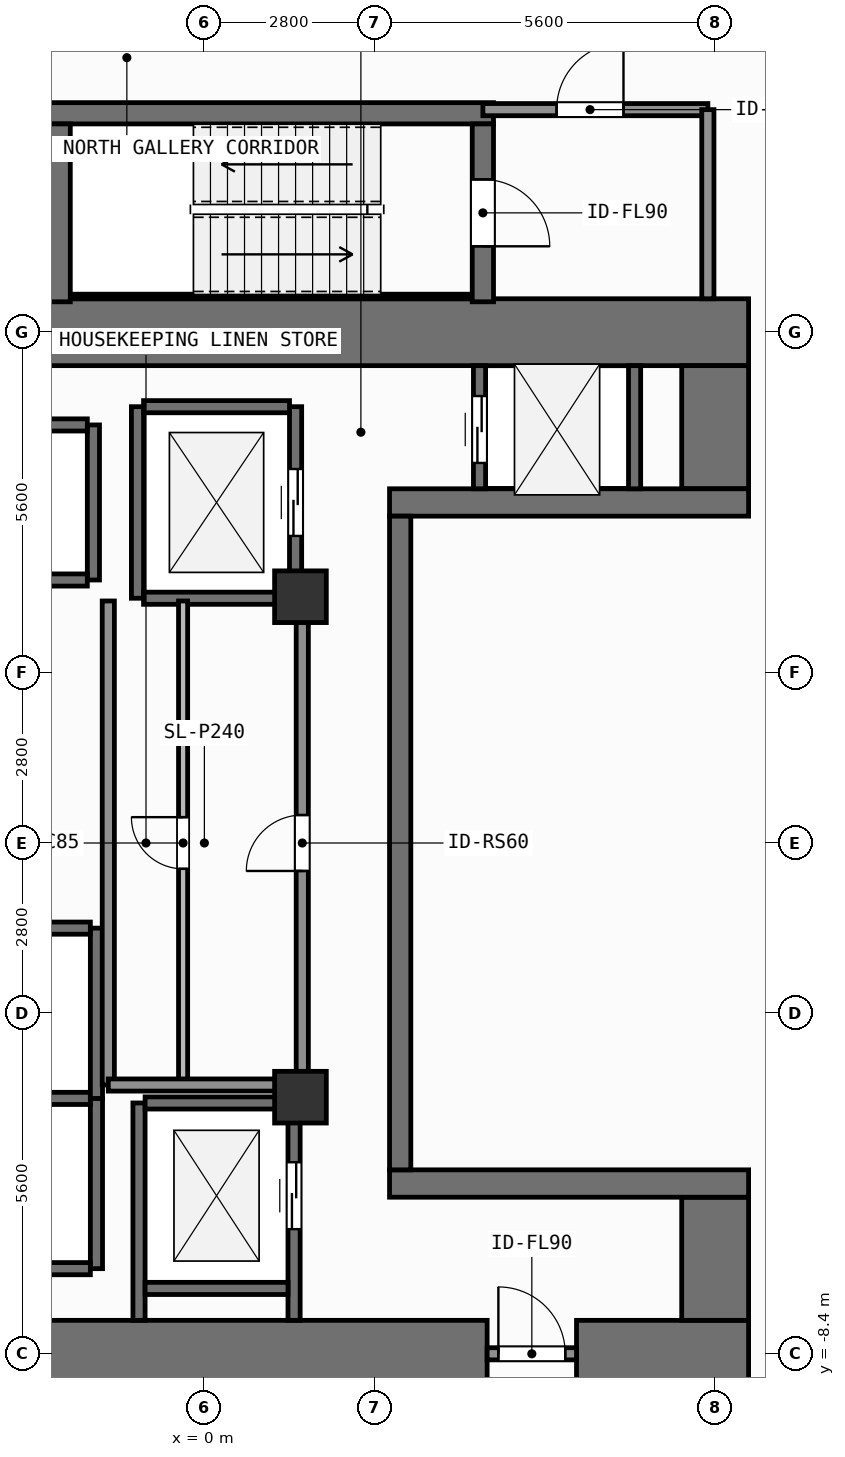
"""IFC4 building model, lengths in metres.
Left out: names, types, materials, properties, quantities, classifications, styles, units other than length and angle.
Written with IfcOpenShell. Run it as: python <this file> out.ifc"""

import sys

from ifc_helpers import new_model, si_unit, direction, frame, frame_2d, origin, origin_2d, place, context, subcontext, project, spatial, rectangle, extrude, element, fill, save


model = new_model("IFC4")
c1 = context("Model", 3, precision=1e-05, world=origin(), true_north=direction((0.0, 1.0)))
c2 = subcontext(c1, "Body", "Model", "MODEL_VIEW")
j1 = project(units=[si_unit("LENGTHUNIT", "METRE"), si_unit("PLANEANGLEUNIT", "RADIAN")], contexts=[c1])
p1 = place(None, origin())
s1 = spatial("IfcSite", under=j1, at=p1, CompositionType="ELEMENT")
p2 = place(p1, origin())
s2 = spatial("IfcBuilding", under=s1, at=p2, CompositionType="ELEMENT")
p3 = place(p2, frame((0.0, 0.0, 17.4)))
s3 = spatial("IfcBuildingStorey", under=s2, at=p3, CompositionType="ELEMENT", Elevation=17.4)
p4 = place(p3, frame((-2.62, -8.4, 0.0), z_axis=(0.0, 0.0, 1.0), x_axis=(1.0, 0.0, 0.0)))
e1 = element("IfcWall", 1, at=p4, inside=s3, PredefinedType="SHEAR", context=c2, shape_type="SweptSolid", body=[
    extrude(rectangle(XDim=7.27, YDim=1.1, at=frame_2d((3.635, 0.0))), origin(), (0.0, 0.0, 1.0), 4.2),
])
p5 = place(p3, frame((6.12, -8.4, 0.0), z_axis=(0.0, 0.0, 1.0), x_axis=(1.0, 0.0, 0.0)))
e2 = element("IfcWall", 2, at=p5, inside=s3, PredefinedType="SHEAR", context=c2, shape_type="SweptSolid", body=[
    extrude(rectangle(XDim=2.83, YDim=1.1, at=frame_2d((1.415, 0.0))), origin(), (0.0, 0.0, 1.0), 4.2),
])
p6 = place(p3, frame((-7.55, 8.4, 0.0), z_axis=(0.0, 0.0, 1.0), x_axis=(1.0, 0.0, 0.0)))
e3 = element("IfcWall", 3, at=p6, inside=s3, PredefinedType="SHEAR", context=c2, shape_type="SweptSolid", body=[
    extrude(rectangle(XDim=16.5, YDim=1.1, at=frame_2d((8.25, 0.0))), origin(), (0.0, 0.0, 1.0), 4.2),
])
for number, where, z_axis, x_axis in (
    (4, (8.4, -7.85, 0.0), (0.0, 0.0, 1.0), (0.0, 1.0, 0.0)),
    (5, (8.4, 5.825, 0.0), (0.0, 0.0, 1.0), (0.0, 1.0, 0.0)),
):
    element("IfcWall", number, at=place(p3, frame(where, z_axis=z_axis, x_axis=x_axis)), inside=s3, PredefinedType="SHEAR", context=c2, shape_type="SweptSolid", body=[
        extrude(rectangle(XDim=2.025, YDim=1.1, at=frame_2d((1.013, 0.0))), origin(), (0.0, 0.0, 1.0), 4.2),
    ])
for number, where, z_axis, x_axis in (
    (6, (3.045, -5.6, 0.0), (0.0, 0.0, 1.0), (1.0, 0.0, 0.0)),
    (7, (3.045, 5.6, 0.0), (0.0, 0.0, 1.0), (1.0, 0.0, 0.0)),
):
    element("IfcWall", number, at=place(p3, frame(where, z_axis=z_axis, x_axis=x_axis)), inside=s3, PredefinedType="SHEAR", context=c2, shape_type="SweptSolid", body=[
        extrude(rectangle(XDim=5.905, YDim=0.45, at=frame_2d((2.953, 0.0))), origin(), (0.0, 0.0, 1.0), 4.2),
    ])
p7 = place(p3, frame((3.22, -5.375, 0.0), z_axis=(0.0, 0.0, 1.0), x_axis=(0.0, 1.0, 0.0)))
e8 = element("IfcWall", 8, at=p7, inside=s3, PredefinedType="SHEAR", context=c2, shape_type="SweptSolid", body=[
    extrude(rectangle(XDim=10.75, YDim=0.35, at=frame_2d((5.375, 0.0))), origin(), (0.0, 0.0, 1.0), 4.2),
])
p8 = place(p3, frame((-2.555, 12.0, 0.0), z_axis=(0.0, 0.0, 1.0), x_axis=(1.0, 0.0, 0.0)))
e9 = element("IfcWall", 9, at=p8, inside=s3, PredefinedType="SHEAR", context=c2, shape_type="SweptSolid", body=[
    extrude(rectangle(XDim=7.31, YDim=0.35, at=frame_2d((3.655, 0.0))), origin(), (0.0, 0.0, 1.0), 4.2),
])
p9 = place(p3, frame((-2.2, 8.988, 0.0), z_axis=(0.0, 0.0, 1.0), x_axis=(1.0, 0.0, 0.0)))
e10 = element("IfcWall", 10, at=p9, inside=s3, PredefinedType="SHEAR", context=c2, shape_type="SweptSolid", body=[
    extrude(rectangle(XDim=6.6, YDim=0.075, at=frame_2d((3.3, 0.0))), origin(), (0.0, 0.0, 1.0), 4.2),
])
p10 = place(p3, frame((-2.38, 8.9, 0.0), z_axis=(0.0, 0.0, 1.0), x_axis=(0.0, 1.0, 0.0)))
e11 = element("IfcWall", 11, at=p10, inside=s3, PredefinedType="SHEAR", context=c2, shape_type="SweptSolid", body=[
    extrude(rectangle(XDim=2.925, YDim=0.35, at=frame_2d((1.462, 0.0))), origin(), (0.0, 0.0, 1.0), 4.2),
])
p11 = place(p3, frame((4.58, 11.825, 0.0), z_axis=(0.0, 0.0, 1.0), x_axis=(0.0, -1.0, 0.0)))
e12 = element("IfcWall", 12, at=p11, inside=s3, PredefinedType="SHEAR", context=c2, shape_type="SweptSolid", body=[
    extrude(rectangle(XDim=2.925, YDim=0.35, at=frame_2d((1.462, 0.0))), origin(), (0.0, 0.0, 1.0), 4.2),
])
p12 = place(p11, frame((0.913, 0.0, 0.0)))
e13 = element("IfcOpeningElement", 13, at=p12, cuts=e12, PredefinedType="OPENING", context=c2, shape_type="SweptSolid", body=[
    extrude(rectangle(XDim=1.1, YDim=2.15, at=frame_2d((0.55, 1.075))), frame((0.0, 0.185, 0.0), z_axis=(0.0, -1.0, 0.0), x_axis=(1.0, 0.0, 0.0)), (0.0, 0.0, 1.0), 0.37),
])
for number, where, z_axis, x_axis in (
    (14, (1.58, -4.18, 0.0), (0.0, 0.0, 1.0), (1.0, 0.0, 0.0)),
    (15, (1.58, 4.05, 0.0), (0.0, 0.0, 1.0), (1.0, 0.0, 0.0)),
):
    element("IfcColumn", number, at=place(p3, frame(where, z_axis=z_axis, x_axis=x_axis)), inside=s3, PredefinedType="COLUMN", context=c2, shape_type="SweptSolid", body=[
        extrude(rectangle(XDim=0.85, YDim=0.85, at=origin_2d()), origin(), (0.0, 0.0, 1.0), 4.2),
    ])
p13 = place(p3, frame((-1.825, 4.325, 0.0), z_axis=(0.0, 0.0, 1.0), x_axis=(0.0, 1.0, 0.0)))
e16 = element("IfcWall", 16, at=p13, inside=s3, PredefinedType="SHEAR", context=c2, shape_type="SweptSolid", body=[
    extrude(rectangle(XDim=2.55, YDim=0.2, at=frame_2d((1.275, 0.0))), origin(), (0.0, 0.0, 1.0), 3.96),
])
for number, where, z_axis, x_axis in (
    (17, (-4.275, 4.325, 0.0), (0.0, 0.0, 1.0), (1.0, 0.0, 0.0)),
    (18, (-4.275, 6.875, 0.0), (0.0, 0.0, 1.0), (1.0, 0.0, 0.0)),
):
    element("IfcWall", number, at=place(p3, frame(where, z_axis=z_axis, x_axis=x_axis)), inside=s3, PredefinedType="SHEAR", context=c2, shape_type="SweptSolid", body=[
        extrude(rectangle(XDim=2.35, YDim=0.2, at=frame_2d((1.175, 0.0))), origin(), (0.0, 0.0, 1.0), 3.96),
    ])
p14 = place(p3, frame((-1.775, -7.0, 0.0), z_axis=(0.0, 0.0, 1.0), x_axis=(0.0, 1.0, 0.0)))
e19 = element("IfcWall", 19, at=p14, inside=s3, PredefinedType="SHEAR", context=c2, shape_type="SweptSolid", body=[
    extrude(rectangle(XDim=2.8, YDim=0.2, at=frame_2d((1.4, 0.0))), origin(), (0.0, 0.0, 1.0), 3.96),
])
for number, where, z_axis, x_axis in (
    (20, (-4.325, -7.0, 0.0), (0.0, 0.0, 1.0), (1.0, 0.0, 0.0)),
    (21, (-4.325, -4.2, 0.0), (0.0, 0.0, 1.0), (1.0, 0.0, 0.0)),
):
    element("IfcWall", number, at=place(p3, frame(where, z_axis=z_axis, x_axis=x_axis)), inside=s3, PredefinedType="SHEAR", context=c2, shape_type="SweptSolid", body=[
        extrude(rectangle(XDim=2.45, YDim=0.2, at=frame_2d((1.225, 0.0))), origin(), (0.0, 0.0, 1.0), 3.96),
    ])
p15 = place(p3, frame((-1.775, -4.2, 0.0), z_axis=(0.0, 0.0, 1.0), x_axis=(0.0, 1.0, 0.0)))
e22 = element("IfcWall", 22, at=p15, inside=s3, PredefinedType="SHEAR", context=c2, shape_type="SweptSolid", body=[
    extrude(rectangle(XDim=2.8, YDim=0.2, at=frame_2d((1.4, 0.0))), origin(), (0.0, 0.0, 1.0), 3.96),
])
p16 = place(p3, frame((-4.325, -1.4, 0.0), z_axis=(0.0, 0.0, 1.0), x_axis=(1.0, 0.0, 0.0)))
e23 = element("IfcWall", 23, at=p16, inside=s3, PredefinedType="SHEAR", context=c2, shape_type="SweptSolid", body=[
    extrude(rectangle(XDim=2.45, YDim=0.2, at=frame_2d((1.225, 0.0))), origin(), (0.0, 0.0, 1.0), 3.96),
])
p17 = place(p3, frame((-1.1, 4.025, 0.0), z_axis=(0.0, 0.0, 1.0), x_axis=(0.0, 1.0, 0.0)))
e24 = element("IfcWall", 24, at=p17, inside=s3, PredefinedType="SHEAR", context=c2, shape_type="SweptSolid", body=[
    extrude(rectangle(XDim=3.15, YDim=0.2, at=frame_2d((1.575, 0.0))), origin(), (0.0, 0.0, 1.0), 3.96),
])
p18 = place(p3, frame((1.5, 4.025, 0.0), z_axis=(0.0, 0.0, 1.0), x_axis=(0.0, 1.0, 0.0)))
e25 = element("IfcWall", 25, at=p18, inside=s3, PredefinedType="SHEAR", context=c2, shape_type="SweptSolid", body=[
    extrude(rectangle(XDim=3.15, YDim=0.2, at=frame_2d((1.575, 0.0))), origin(), (0.0, 0.0, 1.0), 3.96),
])
p19 = place(p18, frame((1.025, 0.0, 0.0)))
e26 = element("IfcOpeningElement", 26, at=p19, cuts=e25, PredefinedType="OPENING", context=c2, shape_type="SweptSolid", body=[
    extrude(rectangle(XDim=1.1, YDim=2.2, at=frame_2d((0.55, 1.1))), frame((0.0, 0.11, 0.0), z_axis=(0.0, -1.0, 0.0), x_axis=(1.0, 0.0, 0.0)), (0.0, 0.0, 1.0), 0.22),
])
for number, where, z_axis, x_axis in (
    (27, (-1.0, 4.025, 0.0), (0.0, 0.0, 1.0), (1.0, 0.0, 0.0)),
    (28, (-1.0, 7.175, 0.0), (0.0, 0.0, 1.0), (1.0, 0.0, 0.0)),
):
    element("IfcWall", number, at=place(p3, frame(where, z_axis=z_axis, x_axis=x_axis)), inside=s3, PredefinedType="SHEAR", context=c2, shape_type="SweptSolid", body=[
        extrude(rectangle(XDim=2.4, YDim=0.2, at=frame_2d((1.2, 0.0))), origin(), (0.0, 0.0, 1.0), 3.96),
    ])
p20 = place(p3, frame((-1.075, -7.85, 0.0), z_axis=(0.0, 0.0, 1.0), x_axis=(0.0, 1.0, 0.0)))
e29 = element("IfcWall", 29, at=p20, inside=s3, PredefinedType="SHEAR", context=c2, shape_type="SweptSolid", body=[
    extrude(rectangle(XDim=3.575, YDim=0.2, at=frame_2d((1.788, 0.0))), origin(), (0.0, 0.0, 1.0), 3.96),
])
p21 = place(p3, frame((1.475, -7.85, 0.0), z_axis=(0.0, 0.0, 1.0), x_axis=(0.0, 1.0, 0.0)))
e30 = element("IfcWall", 30, at=p21, inside=s3, PredefinedType="SHEAR", context=c2, shape_type="SweptSolid", body=[
    extrude(rectangle(XDim=3.575, YDim=0.2, at=frame_2d((1.788, 0.0))), origin(), (0.0, 0.0, 1.0), 3.96),
])
p22 = place(p21, frame((1.5, 0.0, 0.0)))
e31 = element("IfcOpeningElement", 31, at=p22, cuts=e30, PredefinedType="OPENING", context=c2, shape_type="SweptSolid", body=[
    extrude(rectangle(XDim=1.1, YDim=2.2, at=frame_2d((0.55, 1.1))), frame((0.0, 0.11, 0.0), z_axis=(0.0, -1.0, 0.0), x_axis=(1.0, 0.0, 0.0)), (0.0, 0.0, 1.0), 0.22),
])
for number, where, z_axis, x_axis in (
    (32, (-0.975, -7.325, 0.0), (0.0, 0.0, 1.0), (1.0, 0.0, 0.0)),
    (33, (-0.975, -4.275, 0.0), (0.0, 0.0, 1.0), (1.0, 0.0, 0.0)),
):
    element("IfcWall", number, at=place(p3, frame(where, z_axis=z_axis, x_axis=x_axis)), inside=s3, PredefinedType="SHEAR", context=c2, shape_type="SweptSolid", body=[
        extrude(rectangle(XDim=2.35, YDim=0.2, at=frame_2d((1.175, 0.0))), origin(), (0.0, 0.0, 1.0), 3.96),
    ])
p23 = place(p3, frame((4.525, 5.825, 0.0), z_axis=(0.0, 0.0, 1.0), x_axis=(0.0, 1.0, 0.0)))
e34 = element("IfcWall", 34, at=p23, inside=s3, PredefinedType="SHEAR", context=c2, shape_type="SweptSolid", body=[
    extrude(rectangle(XDim=2.025, YDim=0.2, at=frame_2d((1.013, 0.0))), origin(), (0.0, 0.0, 1.0), 3.96),
])
p24 = place(p23, frame((0.425, 0.0, 0.0)))
e35 = element("IfcOpeningElement", 35, at=p24, cuts=e34, PredefinedType="OPENING", context=c2, shape_type="SweptSolid", body=[
    extrude(rectangle(XDim=1.1, YDim=2.2, at=frame_2d((0.55, 1.1))), frame((0.0, 0.11, 0.0), z_axis=(0.0, -1.0, 0.0), x_axis=(1.0, 0.0, 0.0)), (0.0, 0.0, 1.0), 0.22),
])
p25 = place(p3, frame((7.075, 5.825, 0.0), z_axis=(0.0, 0.0, 1.0), x_axis=(0.0, 1.0, 0.0)))
e36 = element("IfcWall", 36, at=p25, inside=s3, PredefinedType="SHEAR", context=c2, shape_type="SweptSolid", body=[
    extrude(rectangle(XDim=2.025, YDim=0.2, at=frame_2d((1.013, 0.0))), origin(), (0.0, 0.0, 1.0), 3.96),
])
p26 = place(p3, frame((4.65, -8.4, 0.0), z_axis=(0.0, 0.0, 1.0), x_axis=(1.0, 0.0, 0.0)))
e37 = element("IfcWall", 37, at=p26, inside=s3, PredefinedType="SOLIDWALL", context=c2, shape_type="SweptSolid", body=[
    extrude(rectangle(XDim=1.47, YDim=0.2, at=frame_2d((0.735, 0.0))), origin(), (0.0, 0.0, 1.0), 3.0),
])
p27 = place(p26, frame((0.185, 0.0, 0.0)))
e38 = element("IfcOpeningElement", 38, at=p27, cuts=e37, PredefinedType="OPENING", context=c2, shape_type="SweptSolid", body=[
    extrude(rectangle(XDim=1.1, YDim=2.15, at=frame_2d((0.55, 1.075))), frame((0.0, 0.11, 0.0), z_axis=(0.0, -1.0, 0.0), x_axis=(1.0, 0.0, 0.0)), (0.0, 0.0, 1.0), 0.22),
])
p28 = place(p3, frame((4.58, 12.06, 0.0), z_axis=(0.0, 0.0, 1.0), x_axis=(1.0, 0.0, 0.0)))
e39 = element("IfcWall", 39, at=p28, inside=s3, PredefinedType="SOLIDWALL", context=c2, shape_type="SweptSolid", body=[
    extrude(rectangle(XDim=3.7, YDim=0.2, at=frame_2d((1.85, 0.0))), origin(), (0.0, 0.0, 1.0), 3.96),
])
p29 = place(p28, frame((1.212, 0.0, 0.0)))
e40 = element("IfcOpeningElement", 40, at=p29, cuts=e39, PredefinedType="OPENING", context=c2, shape_type="SweptSolid", body=[
    extrude(rectangle(XDim=1.1, YDim=2.15, at=frame_2d((0.55, 1.075))), frame((0.0, 0.11, 0.0), z_axis=(0.0, -1.0, 0.0), x_axis=(1.0, 0.0, 0.0)), (0.0, 0.0, 1.0), 0.22),
])
p30 = place(p3, frame((-0.35, -3.98, 0.0), z_axis=(0.0, 0.0, 1.0), x_axis=(0.0, 1.0, 0.0)))
e41 = element("IfcWall", 41, at=p30, inside=s3, PredefinedType="PARTITIONING", context=c2, shape_type="SweptSolid", body=[
    extrude(rectangle(XDim=7.96, YDim=0.15, at=frame_2d((3.98, 0.0))), origin(), (0.0, 0.0, 1.0), 3.96),
])
p31 = place(p30, frame((3.555, 0.0, 0.0)))
e42 = element("IfcOpeningElement", 42, at=p31, cuts=e41, PredefinedType="OPENING", context=c2, shape_type="SweptSolid", body=[
    extrude(rectangle(XDim=0.85, YDim=2.1, at=frame_2d((0.425, 1.05))), frame((0.0, 0.085, 0.0), z_axis=(0.0, -1.0, 0.0), x_axis=(1.0, 0.0, 0.0)), (0.0, 0.0, 1.0), 0.17),
])
p32 = place(p3, frame((1.61, -3.98, 0.0), z_axis=(0.0, 0.0, 1.0), x_axis=(0.0, 1.0, 0.0)))
e43 = element("IfcWall", 43, at=p32, inside=s3, PredefinedType="SOLIDWALL", context=c2, shape_type="SweptSolid", body=[
    extrude(rectangle(XDim=7.96, YDim=0.2, at=frame_2d((3.98, 0.0))), origin(), (0.0, 0.0, 1.0), 3.96),
])
p33 = place(p32, frame((3.52, 0.0, 0.0)))
e44 = element("IfcOpeningElement", 44, at=p33, cuts=e43, PredefinedType="OPENING", context=c2, shape_type="SweptSolid", body=[
    extrude(rectangle(XDim=0.92, YDim=2.1, at=frame_2d((0.46, 1.05))), frame((0.0, 0.11, 0.0), z_axis=(0.0, -1.0, 0.0), x_axis=(1.0, 0.0, 0.0)), (0.0, 0.0, 1.0), 0.22),
])
p34 = place(p3, frame((8.28, 8.95, 0.0), z_axis=(0.0, 0.0, 1.0), x_axis=(0.0, 1.0, 0.0)))
e45 = element("IfcWall", 45, at=p34, inside=s3, PredefinedType="SOLIDWALL", context=c2, shape_type="SweptSolid", body=[
    extrude(rectangle(XDim=3.11, YDim=0.2, at=frame_2d((1.555, 0.0))), origin(), (0.0, 0.0, 1.0), 3.96),
])
p35 = place(p3, frame((-1.58, -3.98, 0.0), z_axis=(0.0, 0.0, 1.0), x_axis=(0.0, 1.0, 0.0)))
e46 = element("IfcWall", 46, at=p35, inside=s3, PredefinedType="SOLIDWALL", context=c2, shape_type="SweptSolid", body=[
    extrude(rectangle(XDim=7.96, YDim=0.2, at=frame_2d((3.98, 0.0))), origin(), (0.0, 0.0, 1.0), 3.96),
])
p36 = place(p3, frame((-1.58, -3.98, 0.0), z_axis=(0.0, 0.0, 1.0), x_axis=(1.0, 0.0, 0.0)))
e47 = element("IfcWall", 47, at=p36, inside=s3, PredefinedType="SOLIDWALL", context=c2, shape_type="SweptSolid", body=[
    extrude(rectangle(XDim=3.19, YDim=0.2, at=frame_2d((1.595, 0.0))), origin(), (0.0, 0.0, 1.0), 3.96),
])
p37 = place(p19, origin())
e48 = element("IfcDoor", 48, at=p37, inside=s3, OperationType="SLIDING_TO_LEFT", PredefinedType="DOOR", context=c2, shape_type="SweptSolid", body=[
    extrude(rectangle(XDim=1.1, YDim=2.2, at=frame_2d((0.55, 1.1))), frame((0.0, 0.025, 0.0), z_axis=(0.0, -1.0, 0.0), x_axis=(1.0, 0.0, 0.0)), (0.0, 0.0, 1.0), 0.05),
])
fill(e26, e48)
p38 = place(p22, origin())
e49 = element("IfcDoor", 49, at=p38, inside=s3, OperationType="SLIDING_TO_LEFT", PredefinedType="DOOR", context=c2, shape_type="SweptSolid", body=[
    extrude(rectangle(XDim=1.1, YDim=2.2, at=frame_2d((0.55, 1.1))), frame((0.0, 0.025, 0.0), z_axis=(0.0, -1.0, 0.0), x_axis=(1.0, 0.0, 0.0)), (0.0, 0.0, 1.0), 0.05),
])
fill(e31, e49)
p39 = place(p24, origin())
e50 = element("IfcDoor", 50, at=p39, inside=s3, OperationType="SLIDING_TO_LEFT", PredefinedType="DOOR", context=c2, shape_type="SweptSolid", body=[
    extrude(rectangle(XDim=1.1, YDim=2.2, at=frame_2d((0.55, 1.1))), frame((0.0, 0.025, 0.0), z_axis=(0.0, -1.0, 0.0), x_axis=(1.0, 0.0, 0.0)), (0.0, 0.0, 1.0), 0.05),
])
fill(e35, e50)
p40 = place(p12, origin())
e51 = element("IfcDoor", 51, at=p40, inside=s3, OperationType="SINGLE_SWING_RIGHT", PredefinedType="DOOR", context=c2, shape_type="SweptSolid", body=[
    extrude(rectangle(XDim=1.1, YDim=2.15, at=frame_2d((0.55, 1.075))), frame((0.0, 0.025, 0.0), z_axis=(0.0, -1.0, 0.0), x_axis=(1.0, 0.0, 0.0)), (0.0, 0.0, 1.0), 0.05),
])
fill(e13, e51)
p41 = place(p27, origin())
e52 = element("IfcDoor", 52, at=p41, inside=s3, OperationType="SINGLE_SWING_LEFT", PredefinedType="DOOR", context=c2, shape_type="SweptSolid", body=[
    extrude(rectangle(XDim=1.1, YDim=2.15, at=frame_2d((0.55, 1.075))), frame((0.0, 0.025, 0.0), z_axis=(0.0, -1.0, 0.0), x_axis=(1.0, 0.0, 0.0)), (0.0, 0.0, 1.0), 0.05),
])
fill(e38, e52)
p42 = place(p29, origin())
e53 = element("IfcDoor", 53, at=p42, inside=s3, OperationType="SINGLE_SWING_RIGHT", PredefinedType="DOOR", context=c2, shape_type="SweptSolid", body=[
    extrude(rectangle(XDim=1.1, YDim=2.15, at=frame_2d((0.55, 1.075))), frame((0.0, 0.025, 0.0), z_axis=(0.0, -1.0, 0.0), x_axis=(1.0, 0.0, 0.0)), (0.0, 0.0, 1.0), 0.05),
])
fill(e40, e53)
p43 = place(p31, origin())
e54 = element("IfcDoor", 54, at=p43, inside=s3, OperationType="SINGLE_SWING_RIGHT", PredefinedType="DOOR", context=c2, shape_type="SweptSolid", body=[
    extrude(rectangle(XDim=0.85, YDim=2.1, at=frame_2d((0.425, 1.05))), frame((0.0, 0.025, 0.0), z_axis=(0.0, -1.0, 0.0), x_axis=(1.0, 0.0, 0.0)), (0.0, 0.0, 1.0), 0.05),
])
fill(e42, e54)
p44 = place(p33, origin())
e55 = element("IfcDoor", 55, at=p44, inside=s3, OperationType="SINGLE_SWING_LEFT", PredefinedType="DOOR", context=c2, shape_type="SweptSolid", body=[
    extrude(rectangle(XDim=0.92, YDim=2.1, at=frame_2d((0.46, 1.05))), frame((0.0, 0.025, 0.0), z_axis=(0.0, -1.0, 0.0), x_axis=(1.0, 0.0, 0.0)), (0.0, 0.0, 1.0), 0.05),
])
fill(e44, e55)
save(model, sys.argv[1])
